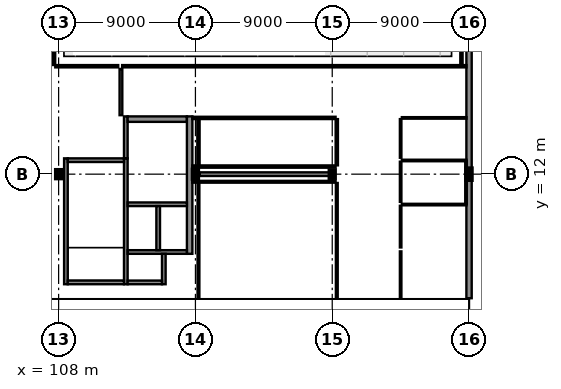
"""IFC4 building model, lengths in metres.
Left out: names, types, materials, properties, quantities, classifications, styles, units other than length and angle.
Written with IfcOpenShell. Run it as: python <this file> out.ifc"""

import sys

from ifc_helpers import new_model, si_unit, direction, frame, frame_2d, origin, origin_2d, place, context, subcontext, project, spatial, rectangle, i_section, extrude, element, fill, save


model = new_model("IFC4")
c1 = context("Model", 3, precision=1e-05, world=origin(), true_north=direction((0.0, 1.0)))
c2 = subcontext(c1, "Body", "Model", "MODEL_VIEW")
j1 = project(units=[si_unit("LENGTHUNIT", "METRE"), si_unit("PLANEANGLEUNIT", "RADIAN")], contexts=[c1])
p1 = place(None, origin())
s1 = spatial("IfcSite", under=j1, at=p1, CompositionType="ELEMENT")
p2 = place(p1, origin())
s2 = spatial("IfcBuilding", under=s1, at=p2, CompositionType="ELEMENT")
p3 = place(p2, origin())
s3 = spatial("IfcBuildingStorey", under=s2, at=p3, CompositionType="ELEMENT", Elevation=0.0)
p4 = place(p3, frame((108.0, 12.0, 0.0), z_axis=(0.0, 0.0, 1.0), x_axis=(1.0, 0.0, 0.0)))
e1 = element("IfcColumn", 1, at=p4, inside=s3, PredefinedType="COLUMN", context=c2, shape_type="SweptSolid", body=[
    extrude(i_section(OverallWidth=0.3, OverallDepth=0.5, WebThickness=0.014, FlangeThickness=0.028, at=origin_2d()), origin(), (0.0, 0.0, 1.0), 5.4),
])
p5 = place(p3, frame((117.0, 12.0, 0.0), z_axis=(0.0, 0.0, 1.0), x_axis=(0.0, 1.0, 0.0)))
e2 = element("IfcColumn", 2, at=p5, inside=s3, PredefinedType="COLUMN", context=c2, shape_type="SweptSolid", body=[
    extrude(i_section(OverallWidth=0.3, OverallDepth=0.55, WebThickness=0.015, FlangeThickness=0.029, at=origin_2d()), origin(), (0.0, 0.0, 1.0), 5.4),
])
p6 = place(p3, frame((126.0, 12.0, 0.0), z_axis=(0.0, 0.0, 1.0), x_axis=(1.0, 0.0, 0.0)))
e3 = element("IfcColumn", 3, at=p6, inside=s3, PredefinedType="COLUMN", context=c2, shape_type="SweptSolid", body=[
    extrude(i_section(OverallWidth=0.3, OverallDepth=0.45, WebThickness=0.014, FlangeThickness=0.026, at=origin_2d()), origin(), (0.0, 0.0, 1.0), 5.4),
])
p7 = place(p3, frame((135.0, 12.0, 0.0), z_axis=(0.0, 0.0, 1.0), x_axis=(1.0, 0.0, 0.0)))
e4 = element("IfcColumn", 4, at=p7, inside=s3, PredefinedType="COLUMN", context=c2, shape_type="SweptSolid", body=[
    extrude(i_section(OverallWidth=0.304, OverallDepth=0.716, WebThickness=0.021, FlangeThickness=0.04, at=origin_2d()), origin(), (0.0, 0.0, 1.0), 5.4),
])
p8 = place(p3, frame((135.0, 3.84, 0.0), z_axis=(0.0, 0.0, 1.0), x_axis=(0.0, 1.0, 0.0)))
e5 = element("IfcWall", 5, at=p8, inside=s3, PredefinedType="SOLIDWALL", context=c2, shape_type="SweptSolid", body=[
    extrude(rectangle(XDim=7.804, YDim=0.35, at=frame_2d((3.902, 0.0))), origin(), (0.0, 0.0, 1.0), 4.525),
])
p9 = place(p8, frame((3.56, 0.0, 0.0)))
e6 = element("IfcOpeningElement", 6, at=p9, cuts=e5, PredefinedType="OPENING", context=c2, shape_type="SweptSolid", body=[
    extrude(rectangle(XDim=1.6, YDim=2.3, at=frame_2d((0.8, 1.15))), frame((0.0, 0.19, 0.0), z_axis=(0.0, -1.0, 0.0), x_axis=(1.0, 0.0, 0.0)), (0.0, 0.0, 1.0), 0.38),
])
p10 = place(p3, frame((135.0, 12.356, 0.0), z_axis=(0.0, 0.0, 1.0), x_axis=(0.0, 1.0, 0.0)))
e7 = element("IfcWall", 7, at=p10, inside=s3, PredefinedType="SOLIDWALL", context=c2, shape_type="SweptSolid", body=[
    extrude(rectangle(XDim=11.288, YDim=0.35, at=frame_2d((5.644, 0.0))), origin(), (0.0, 0.0, 1.0), 4.525),
])
p11 = place(p10, frame((3.844, 0.0, 0.0)))
e8 = element("IfcOpeningElement", 8, at=p11, cuts=e7, PredefinedType="OPENING", context=c2, shape_type="SweptSolid", body=[
    extrude(rectangle(XDim=2.4, YDim=2.8, at=frame_2d((1.2, 1.4))), frame((0.0, 0.19, 0.0), z_axis=(0.0, -1.0, 0.0), x_axis=(1.0, 0.0, 0.0)), (0.0, 0.0, 1.0), 0.38),
])
p12 = place(p3, frame((108.48, 4.76, 0.0), z_axis=(0.0, 0.0, 1.0), x_axis=(0.0, 1.0, 0.0)))
e9 = element("IfcWall", 9, at=p12, inside=s3, PredefinedType="SHEAR", context=c2, shape_type="SweptSolid", body=[
    extrude(rectangle(XDim=8.28, YDim=0.24, at=frame_2d((4.14, 0.0))), origin(), (0.0, 0.0, 1.0), 5.21),
])
p13 = place(p3, frame((112.42, 4.76, 0.0), z_axis=(0.0, 0.0, 1.0), x_axis=(0.0, 1.0, 0.0)))
e10 = element("IfcWall", 10, at=p13, inside=s3, PredefinedType="SHEAR", context=c2, shape_type="SweptSolid", body=[
    extrude(rectangle(XDim=8.28, YDim=0.24, at=frame_2d((4.14, 0.0))), origin(), (0.0, 0.0, 1.0), 5.21),
])
p14 = place(p13, frame((6.49, 0.0, 0.0)))
e11 = element("IfcOpeningElement", 11, at=p14, cuts=e10, PredefinedType="OPENING", context=c2, shape_type="SweptSolid", body=[
    extrude(rectangle(XDim=1.3, YDim=2.2, at=frame_2d((0.65, 1.1))), frame((0.0, 0.135, 0.0), z_axis=(0.0, -1.0, 0.0), x_axis=(1.0, 0.0, 0.0)), (0.0, 0.0, 1.0), 0.27),
])
for number, where, z_axis, x_axis in (
    (12, (108.6, 4.88, 0.0), (0.0, 0.0, 1.0), (1.0, 0.0, 0.0)),
    (13, (108.6, 12.92, 0.0), (0.0, 0.0, 1.0), (1.0, 0.0, 0.0)),
):
    element("IfcWall", number, at=place(p3, frame(where, z_axis=z_axis, x_axis=x_axis)), inside=s3, PredefinedType="SHEAR", context=c2, shape_type="SweptSolid", body=[
        extrude(rectangle(XDim=3.7, YDim=0.24, at=frame_2d((1.85, 0.0))), origin(), (0.0, 0.0, 1.0), 5.21),
    ])
p15 = place(p3, frame((112.42, 13.04, 0.0), z_axis=(0.0, 0.0, 1.0), x_axis=(0.0, 1.0, 0.0)))
e14 = element("IfcWall", 14, at=p15, inside=s3, PredefinedType="SHEAR", context=c2, shape_type="SweptSolid", body=[
    extrude(rectangle(XDim=2.76, YDim=0.24, at=frame_2d((1.38, 0.0))), origin(), (0.0, 0.0, 1.0), 5.06),
])
p16 = place(p3, frame((112.54, 15.62, 0.0), z_axis=(0.0, 0.0, 1.0), x_axis=(1.0, 0.0, 0.0)))
e15 = element("IfcWall", 15, at=p16, inside=s3, PredefinedType="SHEAR", context=c2, shape_type="SweptSolid", body=[
    extrude(rectangle(XDim=3.9, YDim=0.36, at=frame_2d((1.95, 0.0))), origin(), (0.0, 0.0, 1.0), 5.06),
])
p17 = place(p16, frame((1.15, 0.0, 0.0)))
e16 = element("IfcOpeningElement", 16, at=p17, cuts=e15, PredefinedType="OPENING", context=c2, shape_type="SweptSolid", body=[
    extrude(rectangle(XDim=1.6, YDim=2.25, at=frame_2d((0.8, 1.125))), frame((0.0, 0.195, 0.0), z_axis=(0.0, -1.0, 0.0), x_axis=(1.0, 0.0, 0.0)), (0.0, 0.0, 1.0), 0.39),
])
p18 = place(p3, frame((116.62, 6.76, 0.0), z_axis=(0.0, 0.0, 1.0), x_axis=(0.0, 1.0, 0.0)))
e17 = element("IfcWall", 17, at=p18, inside=s3, PredefinedType="SHEAR", context=c2, shape_type="SweptSolid", body=[
    extrude(rectangle(XDim=9.04, YDim=0.36, at=frame_2d((4.52, 0.0))), origin(), (0.0, 0.0, 1.0), 5.06),
])
p19 = place(p3, frame((112.54, 10.02, 0.0), z_axis=(0.0, 0.0, 1.0), x_axis=(1.0, 0.0, 0.0)))
e18 = element("IfcWall", 18, at=p19, inside=s3, PredefinedType="SHEAR", context=c2, shape_type="SweptSolid", body=[
    extrude(rectangle(XDim=3.9, YDim=0.24, at=frame_2d((1.95, 0.0))), origin(), (0.0, 0.0, 1.0), 5.21),
])
p20 = place(p19, frame((0.235, 0.0, 0.0)))
e19 = element("IfcOpeningElement", 19, at=p20, cuts=e18, PredefinedType="OPENING", context=c2, shape_type="SweptSolid", body=[
    extrude(rectangle(XDim=1.6, YDim=2.3, at=frame_2d((0.8, 1.15))), frame((0.0, 0.135, 0.0), z_axis=(0.0, -1.0, 0.0), x_axis=(1.0, 0.0, 0.0)), (0.0, 0.0, 1.0), 0.27),
])
p21 = place(p19, frame((2.185, 0.0, 0.0)))
e20 = element("IfcOpeningElement", 20, at=p21, cuts=e18, PredefinedType="OPENING", context=c2, shape_type="SweptSolid", body=[
    extrude(rectangle(XDim=1.6, YDim=2.3, at=frame_2d((0.8, 1.15))), frame((0.0, 0.135, 0.0), z_axis=(0.0, -1.0, 0.0), x_axis=(1.0, 0.0, 0.0)), (0.0, 0.0, 1.0), 0.27),
])
p22 = place(p3, frame((112.54, 6.88, 0.0), z_axis=(0.0, 0.0, 1.0), x_axis=(1.0, 0.0, 0.0)))
e21 = element("IfcWall", 21, at=p22, inside=s3, PredefinedType="SHEAR", context=c2, shape_type="SweptSolid", body=[
    extrude(rectangle(XDim=3.9, YDim=0.24, at=frame_2d((1.95, 0.0))), origin(), (0.0, 0.0, 1.0), 5.21),
])
p23 = place(p3, frame((114.55, 7.0, 0.0), z_axis=(0.0, 0.0, 1.0), x_axis=(0.0, 1.0, 0.0)))
e22 = element("IfcWall", 22, at=p23, inside=s3, PredefinedType="SHEAR", context=c2, shape_type="SweptSolid", body=[
    extrude(rectangle(XDim=2.9, YDim=0.24, at=frame_2d((1.45, 0.0))), origin(), (0.0, 0.0, 1.0), 5.21),
])
p24 = place(p3, frame((114.92, 4.76, 0.0), z_axis=(0.0, 0.0, 1.0), x_axis=(0.0, 1.0, 0.0)))
e23 = element("IfcWall", 23, at=p24, inside=s3, PredefinedType="SHEAR", context=c2, shape_type="SweptSolid", body=[
    extrude(rectangle(XDim=2.0, YDim=0.24, at=frame_2d((1.0, 0.0))), origin(), (0.0, 0.0, 1.0), 5.21),
])
p25 = place(p3, frame((112.54, 4.88, 0.0), z_axis=(0.0, 0.0, 1.0), x_axis=(1.0, 0.0, 0.0)))
e24 = element("IfcWall", 24, at=p25, inside=s3, PredefinedType="SHEAR", context=c2, shape_type="SweptSolid", body=[
    extrude(rectangle(XDim=2.26, YDim=0.24, at=frame_2d((1.13, 0.0))), origin(), (0.0, 0.0, 1.0), 5.21),
])
p26 = place(p3, frame((117.273, 12.0, 0.0), z_axis=(0.0, 0.0, 1.0), x_axis=(1.0, 0.0, 0.0)))
e25 = element("IfcWall", 25, at=p26, inside=s3, PredefinedType="SHEAR", context=c2, shape_type="SweptSolid", body=[
    extrude(rectangle(XDim=8.719, YDim=0.24, at=frame_2d((4.359, 0.0))), origin(), (0.0, 0.0, 1.0), 4.535),
])
p27 = place(p3, frame((112.1, 15.88, 0.0), z_axis=(0.0, 0.0, 1.0), x_axis=(0.0, 1.0, 0.0)))
e26 = element("IfcWall", 26, at=p27, inside=s3, PredefinedType="PARTITIONING", context=c2, shape_type="SweptSolid", body=[
    extrude(rectangle(XDim=3.04, YDim=0.18, at=frame_2d((1.52, 0.0))), origin(), (0.0, 0.0, 1.0), 5.04),
])
p28 = place(p27, frame((0.795, 0.0, 0.0)))
e27 = element("IfcOpeningElement", 27, at=p28, cuts=e26, PredefinedType="OPENING", context=c2, shape_type="SweptSolid", body=[
    extrude(rectangle(XDim=1.45, YDim=2.2, at=frame_2d((0.725, 1.1))), frame((0.0, 0.105, 0.0), z_axis=(0.0, -1.0, 0.0), x_axis=(1.0, 0.0, 0.0)), (0.0, 0.0, 1.0), 0.21),
])
p29 = place(p3, frame((111.92, 19.1, 0.0), z_axis=(0.0, 0.0, 1.0), x_axis=(-1.0, 0.0, 0.0)))
e28 = element("IfcWall", 28, at=p29, inside=s3, PredefinedType="PARTITIONING", context=c2, shape_type="SweptSolid", body=[
    extrude(rectangle(XDim=4.14, YDim=0.15, at=frame_2d((2.07, 0.0))), origin(), (0.0, 0.0, 1.0), 5.04),
])
p30 = place(p3, frame((107.7, 19.18, 0.0), z_axis=(0.0, 0.0, 1.0), x_axis=(0.0, 1.0, 0.0)))
e29 = element("IfcWall", 29, at=p30, inside=s3, PredefinedType="PARTITIONING", context=c2, shape_type="SweptSolid", body=[
    extrude(rectangle(XDim=4.34, YDim=0.15, at=frame_2d((2.17, 0.0))), origin(), (0.0, 0.0, 1.0), 5.04),
])
p31 = place(p30, frame((1.645, 0.0, 0.0)))
e30 = element("IfcOpeningElement", 30, at=p31, cuts=e29, PredefinedType="OPENING", context=c2, shape_type="SweptSolid", body=[
    extrude(rectangle(XDim=1.05, YDim=2.25, at=frame_2d((0.525, 1.125))), frame((0.0, 0.09, 0.0), z_axis=(0.0, -1.0, 0.0), x_axis=(1.0, 0.0, 0.0)), (0.0, 0.0, 1.0), 0.18),
])
p32 = place(p3, frame((134.5, 23.53, 0.0), z_axis=(0.0, 0.0, 1.0), x_axis=(0.0, -1.0, 0.0)))
e31 = element("IfcWall", 31, at=p32, inside=s3, PredefinedType="PARTITIONING", context=c2, shape_type="SweptSolid", body=[
    extrude(rectangle(XDim=4.35, YDim=0.15, at=frame_2d((2.175, 0.0))), origin(), (0.0, 0.0, 1.0), 5.04),
])
p33 = place(p3, frame((134.83, 19.1, 0.0), z_axis=(0.0, 0.0, 1.0), x_axis=(-1.0, 0.0, 0.0)))
e32 = element("IfcWall", 32, at=p33, inside=s3, PredefinedType="PARTITIONING", context=c2, shape_type="SweptSolid", body=[
    extrude(rectangle(XDim=22.65, YDim=0.15, at=frame_2d((11.325, 0.0))), origin(), (0.0, 0.0, 1.0), 5.04),
])
p34 = place(p3, frame((116.795, 11.5, 0.0), z_axis=(0.0, 0.0, 1.0), x_axis=(1.0, 0.0, 0.0)))
e33 = element("IfcWall", 33, at=p34, inside=s3, PredefinedType="PARTITIONING", context=c2, shape_type="SweptSolid", body=[
    extrude(rectangle(XDim=9.425, YDim=0.12, at=frame_2d((4.712, 0.0))), origin(), (0.0, 0.0, 1.0), 5.04),
])
p35 = place(p3, frame((126.3, 11.42, 0.0), z_axis=(0.0, 0.0, 1.0), x_axis=(0.0, -1.0, 0.0)))
e34 = element("IfcWall", 34, at=p35, inside=s3, PredefinedType="PARTITIONING", context=c2, shape_type="SweptSolid", body=[
    extrude(rectangle(XDim=7.545, YDim=0.12, at=frame_2d((3.772, 0.0))), origin(), (0.0, 0.0, 1.0), 5.04),
])
p36 = place(p35, frame((3.322, 0.0, 0.0)))
e35 = element("IfcOpeningElement", 35, at=p36, cuts=e34, PredefinedType="OPENING", context=c2, shape_type="SweptSolid", body=[
    extrude(rectangle(XDim=0.9, YDim=2.1, at=frame_2d((0.45, 1.05))), frame((0.0, 0.075, 0.0), z_axis=(0.0, -1.0, 0.0), x_axis=(1.0, 0.0, 0.0)), (0.0, 0.0, 1.0), 0.15),
])
p37 = place(p3, frame((117.2, 3.875, 0.0), z_axis=(0.0, 0.0, 1.0), x_axis=(0.0, 1.0, 0.0)))
e36 = element("IfcWall", 36, at=p37, inside=s3, PredefinedType="PARTITIONING", context=c2, shape_type="SweptSolid", body=[
    extrude(rectangle(XDim=7.57, YDim=0.12, at=frame_2d((3.785, 0.0))), origin(), (0.0, 0.0, 1.0), 4.635),
])
p38 = place(p3, frame((126.3, 15.62, 0.0), z_axis=(0.0, 0.0, 1.0), x_axis=(0.0, -1.0, 0.0)))
e37 = element("IfcWall", 37, at=p38, inside=s3, PredefinedType="PARTITIONING", context=c2, shape_type="SweptSolid", body=[
    extrude(rectangle(XDim=3.04, YDim=0.15, at=frame_2d((1.52, 0.0))), origin(), (0.0, 0.0, 1.0), 5.04),
])
p39 = place(p38, frame((0.995, 0.0, 0.0)))
e38 = element("IfcOpeningElement", 38, at=p39, cuts=e37, PredefinedType="OPENING", context=c2, shape_type="SweptSolid", body=[
    extrude(rectangle(XDim=1.05, YDim=2.25, at=frame_2d((0.525, 1.125))), frame((0.0, 0.09, 0.0), z_axis=(0.0, -1.0, 0.0), x_axis=(1.0, 0.0, 0.0)), (0.0, 0.0, 1.0), 0.18),
])
p40 = place(p3, frame((126.22, 12.5, 0.0), z_axis=(0.0, 0.0, 1.0), x_axis=(-1.0, 0.0, 0.0)))
e39 = element("IfcWall", 39, at=p40, inside=s3, PredefinedType="PARTITIONING", context=c2, shape_type="SweptSolid", body=[
    extrude(rectangle(XDim=9.425, YDim=0.15, at=frame_2d((4.712, 0.0))), origin(), (0.0, 0.0, 1.0), 5.04),
])
p41 = place(p3, frame((117.2, 12.57, 0.0), z_axis=(0.0, 0.0, 1.0), x_axis=(0.0, 1.0, 0.0)))
e40 = element("IfcWall", 40, at=p41, inside=s3, PredefinedType="PARTITIONING", context=c2, shape_type="SweptSolid", body=[
    extrude(rectangle(XDim=3.05, YDim=0.15, at=frame_2d((1.525, 0.0))), origin(), (0.0, 0.0, 1.0), 4.635),
])
p42 = place(p3, frame((116.795, 15.7, 0.0), z_axis=(0.0, 0.0, 1.0), x_axis=(1.0, 0.0, 0.0)))
e41 = element("IfcWall", 41, at=p42, inside=s3, PredefinedType="PARTITIONING", context=c2, shape_type="SweptSolid", body=[
    extrude(rectangle(XDim=9.425, YDim=0.15, at=frame_2d((4.712, 0.0))), origin(), (0.0, 0.0, 1.0), 5.04),
])
p43 = place(p3, frame((130.5, 3.875, 0.0), z_axis=(0.0, 0.0, 1.0), x_axis=(0.0, 1.0, 0.0)))
e42 = element("IfcWall", 42, at=p43, inside=s3, PredefinedType="PARTITIONING", context=c2, shape_type="SweptSolid", body=[
    extrude(rectangle(XDim=3.045, YDim=0.1, at=frame_2d((1.522, 0.0))), origin(), (0.0, 0.0, 1.0), 5.04),
])
p44 = place(p43, frame((1.073, 0.0, 0.0)))
e43 = element("IfcOpeningElement", 43, at=p44, cuts=e42, PredefinedType="OPENING", context=c2, shape_type="SweptSolid", body=[
    extrude(rectangle(XDim=0.9, YDim=2.05, at=frame_2d((0.45, 1.025))), frame((0.0, 0.065, 0.0), z_axis=(0.0, -1.0, 0.0), x_axis=(1.0, 0.0, 0.0)), (0.0, 0.0, 1.0), 0.13),
])
p45 = place(p3, frame((130.5, 7.18, 0.0), z_axis=(0.0, 0.0, 1.0), x_axis=(0.0, 1.0, 0.0)))
e44 = element("IfcWall", 44, at=p45, inside=s3, PredefinedType="PARTITIONING", context=c2, shape_type="SweptSolid", body=[
    extrude(rectangle(XDim=2.74, YDim=0.1, at=frame_2d((1.37, 0.0))), origin(), (0.0, 0.0, 1.0), 5.04),
])
p46 = place(p45, frame((0.92, 0.0, 0.0)))
e45 = element("IfcOpeningElement", 45, at=p46, cuts=e44, PredefinedType="OPENING", context=c2, shape_type="SweptSolid", body=[
    extrude(rectangle(XDim=0.9, YDim=2.05, at=frame_2d((0.45, 1.025))), frame((0.0, 0.065, 0.0), z_axis=(0.0, -1.0, 0.0), x_axis=(1.0, 0.0, 0.0)), (0.0, 0.0, 1.0), 0.13),
])
for number, where, z_axis, x_axis in (
    (46, (130.58, 10.0, 0.0), (0.0, 0.0, 1.0), (1.0, 0.0, 0.0)),
    (47, (130.58, 12.9, 0.0), (0.0, 0.0, 1.0), (1.0, 0.0, 0.0)),
):
    element("IfcWall", number, at=place(p3, frame(where, z_axis=z_axis, x_axis=x_axis)), inside=s3, PredefinedType="PARTITIONING", context=c2, shape_type="SweptSolid", body=[
        extrude(rectangle(XDim=4.25, YDim=0.1, at=frame_2d((2.125, 0.0))), origin(), (0.0, 0.0, 1.0), 5.04),
    ])
p47 = place(p3, frame((134.8, 12.855, 0.0), z_axis=(0.0, 0.0, 1.0), x_axis=(0.0, -1.0, 0.0)))
e48 = element("IfcWall", 48, at=p47, inside=s3, PredefinedType="PARTITIONING", context=c2, shape_type="SweptSolid", body=[
    extrude(rectangle(XDim=2.81, YDim=0.1, at=frame_2d((1.405, 0.0))), origin(), (0.0, 0.0, 1.0), 5.04),
])
p48 = place(p3, frame((130.5, 10.18, 0.0), z_axis=(0.0, 0.0, 1.0), x_axis=(0.0, 1.0, 0.0)))
e49 = element("IfcWall", 49, at=p48, inside=s3, PredefinedType="PARTITIONING", context=c2, shape_type="SweptSolid", body=[
    extrude(rectangle(XDim=2.64, YDim=0.1, at=frame_2d((1.32, 0.0))), origin(), (0.0, 0.0, 1.0), 5.04),
])
p49 = place(p48, frame((0.82, 0.0, 0.0)))
e50 = element("IfcOpeningElement", 50, at=p49, cuts=e49, PredefinedType="OPENING", context=c2, shape_type="SweptSolid", body=[
    extrude(rectangle(XDim=1.0, YDim=2.1, at=frame_2d((0.5, 1.05))), frame((0.0, 0.065, 0.0), z_axis=(0.0, -1.0, 0.0), x_axis=(1.0, 0.0, 0.0)), (0.0, 0.0, 1.0), 0.13),
])
p50 = place(p3, frame((130.58, 15.7, 0.0), z_axis=(0.0, 0.0, 1.0), x_axis=(1.0, 0.0, 0.0)))
e51 = element("IfcWall", 51, at=p50, inside=s3, PredefinedType="PARTITIONING", context=c2, shape_type="SweptSolid", body=[
    extrude(rectangle(XDim=4.25, YDim=0.1, at=frame_2d((2.125, 0.0))), origin(), (0.0, 0.0, 1.0), 5.04),
])
p51 = place(p3, frame((130.5, 13.08, 0.0), z_axis=(0.0, 0.0, 1.0), x_axis=(0.0, 1.0, 0.0)))
e52 = element("IfcWall", 52, at=p51, inside=s3, PredefinedType="PARTITIONING", context=c2, shape_type="SweptSolid", body=[
    extrude(rectangle(XDim=2.54, YDim=0.1, at=frame_2d((1.27, 0.0))), origin(), (0.0, 0.0, 1.0), 5.04),
])
p52 = place(p51, frame((0.82, 0.0, 0.0)))
e53 = element("IfcOpeningElement", 53, at=p52, cuts=e52, PredefinedType="OPENING", context=c2, shape_type="SweptSolid", body=[
    extrude(rectangle(XDim=0.9, YDim=2.05, at=frame_2d((0.45, 1.025))), frame((0.0, 0.065, 0.0), z_axis=(0.0, -1.0, 0.0), x_axis=(1.0, 0.0, 0.0)), (0.0, 0.0, 1.0), 0.13),
])
p53 = place(p11, frame((2.4, 0.0, 0.0), z_axis=(0.0, 0.0, 1.0), x_axis=(-1.0, 0.0, 0.0)))
e54 = element("IfcDoor", 54, at=p53, inside=s3, OperationType="DOUBLE_DOOR_SINGLE_SWING", PredefinedType="DOOR", context=c2, shape_type="SweptSolid", body=[
    extrude(rectangle(XDim=2.4, YDim=2.8, at=frame_2d((1.2, 1.4))), frame((0.0, 0.025, 0.0), z_axis=(0.0, -1.0, 0.0), x_axis=(1.0, 0.0, 0.0)), (0.0, 0.0, 1.0), 0.05),
])
fill(e8, e54)
p54 = place(p9, frame((1.6, 0.0, 0.0), z_axis=(0.0, 0.0, 1.0), x_axis=(-1.0, 0.0, 0.0)))
e55 = element("IfcDoor", 55, at=p54, inside=s3, OperationType="DOUBLE_DOOR_SINGLE_SWING", PredefinedType="DOOR", context=c2, shape_type="SweptSolid", body=[
    extrude(rectangle(XDim=1.6, YDim=2.3, at=frame_2d((0.8, 1.15))), frame((0.0, 0.025, 0.0), z_axis=(0.0, -1.0, 0.0), x_axis=(1.0, 0.0, 0.0)), (0.0, 0.0, 1.0), 0.05),
])
fill(e6, e55)
p55 = place(p14, frame((1.3, 0.0, 0.0), z_axis=(0.0, 0.0, 1.0), x_axis=(-1.0, 0.0, 0.0)))
e56 = element("IfcDoor", 56, at=p55, inside=s3, OperationType="SINGLE_SWING_RIGHT", PredefinedType="DOOR", context=c2, shape_type="SweptSolid", body=[
    extrude(rectangle(XDim=1.3, YDim=2.2, at=frame_2d((0.65, 1.1))), frame((0.0, 0.025, 0.0), z_axis=(0.0, -1.0, 0.0), x_axis=(1.0, 0.0, 0.0)), (0.0, 0.0, 1.0), 0.05),
])
fill(e11, e56)
p56 = place(p17, origin())
e57 = element("IfcDoor", 57, at=p56, inside=s3, OperationType="DOUBLE_DOOR_SINGLE_SWING", PredefinedType="DOOR", context=c2, shape_type="SweptSolid", body=[
    extrude(rectangle(XDim=1.6, YDim=2.25, at=frame_2d((0.8, 1.125))), frame((0.0, 0.025, 0.0), z_axis=(0.0, -1.0, 0.0), x_axis=(1.0, 0.0, 0.0)), (0.0, 0.0, 1.0), 0.05),
])
fill(e16, e57)
p57 = place(p20, origin())
e58 = element("IfcDoor", 58, at=p57, inside=s3, OperationType="DOUBLE_DOOR_SLIDING", PredefinedType="DOOR", context=c2, shape_type="SweptSolid", body=[
    extrude(rectangle(XDim=1.6, YDim=2.3, at=frame_2d((0.8, 1.15))), frame((0.0, 0.025, 0.0), z_axis=(0.0, -1.0, 0.0), x_axis=(1.0, 0.0, 0.0)), (0.0, 0.0, 1.0), 0.05),
])
fill(e19, e58)
p58 = place(p21, origin())
e59 = element("IfcDoor", 59, at=p58, inside=s3, OperationType="DOUBLE_DOOR_SLIDING", PredefinedType="DOOR", context=c2, shape_type="SweptSolid", body=[
    extrude(rectangle(XDim=1.6, YDim=2.3, at=frame_2d((0.8, 1.15))), frame((0.0, 0.025, 0.0), z_axis=(0.0, -1.0, 0.0), x_axis=(1.0, 0.0, 0.0)), (0.0, 0.0, 1.0), 0.05),
])
fill(e20, e59)
p59 = place(p28, origin())
e60 = element("IfcDoor", 60, at=p59, inside=s3, OperationType="DOUBLE_DOOR_SINGLE_SWING", PredefinedType="DOOR", context=c2, shape_type="SweptSolid", body=[
    extrude(rectangle(XDim=1.45, YDim=2.2, at=frame_2d((0.725, 1.1))), frame((0.0, 0.025, 0.0), z_axis=(0.0, -1.0, 0.0), x_axis=(1.0, 0.0, 0.0)), (0.0, 0.0, 1.0), 0.05),
])
fill(e27, e60)
p60 = place(p36, frame((0.9, 0.0, 0.0), z_axis=(0.0, 0.0, 1.0), x_axis=(-1.0, 0.0, 0.0)))
e61 = element("IfcDoor", 61, at=p60, inside=s3, OperationType="SINGLE_SWING_LEFT", PredefinedType="DOOR", context=c2, shape_type="SweptSolid", body=[
    extrude(rectangle(XDim=0.9, YDim=2.1, at=frame_2d((0.45, 1.05))), frame((0.0, 0.025, 0.0), z_axis=(0.0, -1.0, 0.0), x_axis=(1.0, 0.0, 0.0)), (0.0, 0.0, 1.0), 0.05),
])
fill(e35, e61)
p61 = place(p39, origin())
e62 = element("IfcDoor", 62, at=p61, inside=s3, OperationType="SINGLE_SWING_RIGHT", PredefinedType="DOOR", context=c2, shape_type="SweptSolid", body=[
    extrude(rectangle(XDim=1.05, YDim=2.25, at=frame_2d((0.525, 1.125))), frame((0.0, 0.025, 0.0), z_axis=(0.0, -1.0, 0.0), x_axis=(1.0, 0.0, 0.0)), (0.0, 0.0, 1.0), 0.05),
])
fill(e38, e62)
p62 = place(p44, frame((0.9, 0.0, 0.0), z_axis=(0.0, 0.0, 1.0), x_axis=(-1.0, 0.0, 0.0)))
e63 = element("IfcDoor", 63, at=p62, inside=s3, OperationType="SINGLE_SWING_LEFT", PredefinedType="DOOR", context=c2, shape_type="SweptSolid", body=[
    extrude(rectangle(XDim=0.9, YDim=2.05, at=frame_2d((0.45, 1.025))), frame((0.0, 0.025, 0.0), z_axis=(0.0, -1.0, 0.0), x_axis=(1.0, 0.0, 0.0)), (0.0, 0.0, 1.0), 0.05),
])
fill(e43, e63)
p63 = place(p46, origin())
e64 = element("IfcDoor", 64, at=p63, inside=s3, OperationType="SINGLE_SWING_RIGHT", PredefinedType="DOOR", context=c2, shape_type="SweptSolid", body=[
    extrude(rectangle(XDim=0.9, YDim=2.05, at=frame_2d((0.45, 1.025))), frame((0.0, 0.025, 0.0), z_axis=(0.0, -1.0, 0.0), x_axis=(1.0, 0.0, 0.0)), (0.0, 0.0, 1.0), 0.05),
])
fill(e45, e64)
p64 = place(p49, frame((1.0, 0.0, 0.0), z_axis=(0.0, 0.0, 1.0), x_axis=(-1.0, 0.0, 0.0)))
e65 = element("IfcDoor", 65, at=p64, inside=s3, OperationType="SINGLE_SWING_LEFT", PredefinedType="DOOR", context=c2, shape_type="SweptSolid", body=[
    extrude(rectangle(XDim=1.0, YDim=2.1, at=frame_2d((0.5, 1.05))), frame((0.0, 0.025, 0.0), z_axis=(0.0, -1.0, 0.0), x_axis=(1.0, 0.0, 0.0)), (0.0, 0.0, 1.0), 0.05),
])
fill(e50, e65)
p65 = place(p52, origin())
e66 = element("IfcDoor", 66, at=p65, inside=s3, OperationType="SINGLE_SWING_RIGHT", PredefinedType="DOOR", context=c2, shape_type="SweptSolid", body=[
    extrude(rectangle(XDim=0.9, YDim=2.05, at=frame_2d((0.45, 1.025))), frame((0.0, 0.025, 0.0), z_axis=(0.0, -1.0, 0.0), x_axis=(1.0, 0.0, 0.0)), (0.0, 0.0, 1.0), 0.05),
])
fill(e53, e66)
save(model, sys.argv[1])
